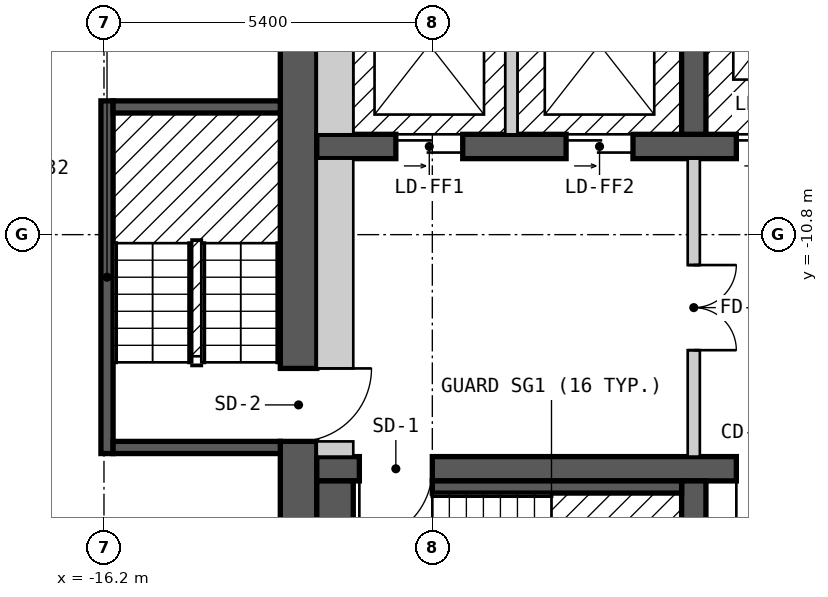
"""IFC4 building model, lengths in metres.
Left out: names, types, materials, properties, quantities, classifications, styles, units other than length and angle.
Written with IfcOpenShell. Run it as: python <this file> out.ifc"""

import sys

from ifc_helpers import new_model, si_unit, direction, frame, frame_2d, origin, origin_2d, place, context, subcontext, project, spatial, polyline, rectangle, outline, extrude, element, fill, save


model = new_model("IFC4")
c1 = context("Model", 3, precision=1e-05, world=origin(), true_north=direction((0.0, 1.0)))
c2 = subcontext(c1, "Body", "Model", "MODEL_VIEW")
j1 = project(units=[si_unit("LENGTHUNIT", "METRE"), si_unit("PLANEANGLEUNIT", "RADIAN")], contexts=[c1])
p1 = place(None, origin())
s1 = spatial("IfcSite", under=j1, at=p1, CompositionType="ELEMENT")
p2 = place(p1, origin())
s2 = spatial("IfcBuilding", under=s1, at=p2, CompositionType="ELEMENT")
p3 = place(p2, frame((0.0, 0.0, 196.2)))
s3 = spatial("IfcBuildingStorey", under=s2, at=p3, CompositionType="ELEMENT", Elevation=196.2)
p4 = place(p3, frame((-17.53, -15.736, 0.0), z_axis=(0.0, 0.0, 1.0), x_axis=(0.5, -0.866025403784, 0.0)))
e1 = element("IfcColumn", 1, at=p4, inside=s3, PredefinedType="COLUMN", context=c2, shape_type="SweptSolid", body=[
    extrude(rectangle(XDim=0.8, YDim=0.8, at=origin_2d()), origin(), (0.0, 0.0, 1.0), 3.0),
])
p5 = place(p3, frame((-13.0, -18.4, 0.0), z_axis=(0.0, 0.0, 1.0), x_axis=(0.0, 1.0, 0.0)))
e2 = element("IfcWall", 2, at=p5, inside=s3, PredefinedType="SHEAR", context=c2, shape_type="SweptSolid", body=[
    extrude(rectangle(XDim=12.8, YDim=0.6, at=frame_2d((6.4, 0.0))), origin(), (0.0, 0.0, 1.0), 2.6),
])
p6 = place(p5, frame((4.2, 0.0, 0.0)))
e3 = element("IfcOpeningElement", 3, at=p6, cuts=e2, PredefinedType="OPENING", context=c2, shape_type="SweptSolid", body=[
    extrude(rectangle(XDim=1.2, YDim=2.1, at=frame_2d((0.6, 1.05))), frame((0.0, 0.31, 0.0), z_axis=(0.0, -1.0, 0.0), x_axis=(1.0, 0.0, 0.0)), (0.0, 0.0, 1.0), 0.62),
])
p7 = place(p3, frame((-12.7, -14.65, 0.0), z_axis=(0.0, 0.0, 1.0), x_axis=(1.0, 0.0, 0.0)))
e4 = element("IfcWall", 4, at=p7, inside=s3, PredefinedType="SHEAR", context=c2, shape_type="SweptSolid", body=[
    extrude(rectangle(XDim=25.4, YDim=0.4, at=frame_2d((12.7, 0.0))), origin(), (0.0, 0.0, 1.0), 2.6),
])
p8 = place(p7, frame((1.9, 0.0, 0.0), z_axis=(0.0, 0.0, 1.0), x_axis=(-1.0, 0.0, 0.0)))
e5 = element("IfcOpeningElement", 5, at=p8, cuts=e4, PredefinedType="OPENING", context=c2, shape_type="SweptSolid", body=[
    extrude(rectangle(XDim=1.2, YDim=2.1, at=frame_2d((0.6, 1.05))), frame((0.0, 0.21, 0.0), z_axis=(0.0, -1.0, 0.0), x_axis=(1.0, 0.0, 0.0)), (0.0, 0.0, 1.0), 0.42),
])
p9 = place(p7, frame((24.75, 0.0, 0.0), z_axis=(0.0, 0.0, 1.0), x_axis=(-1.0, 0.0, 0.0)))
e6 = element("IfcOpeningElement", 6, at=p9, cuts=e4, PredefinedType="OPENING", context=c2, shape_type="SweptSolid", body=[
    extrude(rectangle(XDim=1.2, YDim=2.1, at=frame_2d((0.6, 1.05))), frame((0.0, 0.21, 0.0), z_axis=(0.0, -1.0, 0.0), x_axis=(1.0, 0.0, 0.0)), (0.0, 0.0, 1.0), 0.42),
])
p10 = place(p7, frame((7.8, 0.0, 0.0), z_axis=(0.0, 0.0, 1.0), x_axis=(-1.0, 0.0, 0.0)))
e7 = element("IfcOpeningElement", 7, at=p10, cuts=e4, PredefinedType="OPENING", context=c2, shape_type="SweptSolid", body=[
    extrude(rectangle(XDim=0.9, YDim=2.1, at=frame_2d((0.45, 1.05))), frame((0.0, 0.21, 0.0), z_axis=(0.0, -1.0, 0.0), x_axis=(1.0, 0.0, 0.0)), (0.0, 0.0, 1.0), 0.42),
])
p11 = place(p7, frame((9.85, 0.0, 0.0), z_axis=(0.0, 0.0, 1.0), x_axis=(-1.0, 0.0, 0.0)))
e8 = element("IfcOpeningElement", 8, at=p11, cuts=e4, PredefinedType="OPENING", context=c2, shape_type="SweptSolid", body=[
    extrude(rectangle(XDim=0.9, YDim=2.1, at=frame_2d((0.45, 1.05))), frame((0.0, 0.21, 0.0), z_axis=(0.0, -1.0, 0.0), x_axis=(1.0, 0.0, 0.0)), (0.0, 0.0, 1.0), 0.42),
])
p12 = place(p7, frame((12.15, 0.0, 0.0), z_axis=(0.0, 0.0, 1.0), x_axis=(-1.0, 0.0, 0.0)))
e9 = element("IfcOpeningElement", 9, at=p12, cuts=e4, PredefinedType="OPENING", context=c2, shape_type="SweptSolid", body=[
    extrude(rectangle(XDim=1.0, YDim=2.1, at=frame_2d((0.5, 1.05))), frame((0.0, 0.21, 0.0), z_axis=(0.0, -1.0, 0.0), x_axis=(1.0, 0.0, 0.0)), (0.0, 0.0, 1.0), 0.42),
])
p13 = place(p7, frame((14.35, 0.0, 0.0), z_axis=(0.0, 0.0, 1.0), x_axis=(-1.0, 0.0, 0.0)))
e10 = element("IfcOpeningElement", 10, at=p13, cuts=e4, PredefinedType="OPENING", context=c2, shape_type="SweptSolid", body=[
    extrude(rectangle(XDim=0.9, YDim=2.1, at=frame_2d((0.45, 1.05))), frame((0.0, 0.21, 0.0), z_axis=(0.0, -1.0, 0.0), x_axis=(1.0, 0.0, 0.0)), (0.0, 0.0, 1.0), 0.42),
])
p14 = place(p7, frame((16.35, 0.0, 0.0), z_axis=(0.0, 0.0, 1.0), x_axis=(-1.0, 0.0, 0.0)))
e11 = element("IfcOpeningElement", 11, at=p14, cuts=e4, PredefinedType="OPENING", context=c2, shape_type="SweptSolid", body=[
    extrude(rectangle(XDim=0.9, YDim=2.1, at=frame_2d((0.45, 1.05))), frame((0.0, 0.21, 0.0), z_axis=(0.0, -1.0, 0.0), x_axis=(1.0, 0.0, 0.0)), (0.0, 0.0, 1.0), 0.42),
])
p15 = place(p7, frame((18.5, 0.0, 0.0), z_axis=(0.0, 0.0, 1.0), x_axis=(-1.0, 0.0, 0.0)))
e12 = element("IfcOpeningElement", 12, at=p15, cuts=e4, PredefinedType="OPENING", context=c2, shape_type="SweptSolid", body=[
    extrude(rectangle(XDim=1.0, YDim=2.1, at=frame_2d((0.5, 1.05))), frame((0.0, 0.21, 0.0), z_axis=(0.0, -1.0, 0.0), x_axis=(1.0, 0.0, 0.0)), (0.0, 0.0, 1.0), 0.42),
])
p16 = place(p3, frame((-12.7, -9.35, 0.0), z_axis=(0.0, 0.0, 1.0), x_axis=(1.0, 0.0, 0.0)))
e13 = element("IfcWall", 13, at=p16, inside=s3, PredefinedType="SHEAR", context=c2, shape_type="SweptSolid", body=[
    extrude(rectangle(XDim=22.9, YDim=0.4, at=frame_2d((11.45, 0.0))), origin(), (0.0, 0.0, 1.0), 2.6),
])
p17 = place(p16, frame((1.3, 0.0, 0.0)))
e14 = element("IfcOpeningElement", 14, at=p17, cuts=e13, PredefinedType="OPENING", context=c2, shape_type="SweptSolid", body=[
    extrude(rectangle(XDim=1.1, YDim=2.1, at=frame_2d((0.55, 1.05))), frame((0.0, 0.21, 0.0), z_axis=(0.0, -1.0, 0.0), x_axis=(1.0, 0.0, 0.0)), (0.0, 0.0, 1.0), 0.42),
])
p18 = place(p16, frame((4.1, 0.0, 0.0)))
e15 = element("IfcOpeningElement", 15, at=p18, cuts=e13, PredefinedType="OPENING", context=c2, shape_type="SweptSolid", body=[
    extrude(rectangle(XDim=1.1, YDim=2.1, at=frame_2d((0.55, 1.05))), frame((0.0, 0.21, 0.0), z_axis=(0.0, -1.0, 0.0), x_axis=(1.0, 0.0, 0.0)), (0.0, 0.0, 1.0), 0.42),
])
p19 = place(p16, frame((6.9, 0.0, 0.0)))
e16 = element("IfcOpeningElement", 16, at=p19, cuts=e13, PredefinedType="OPENING", context=c2, shape_type="SweptSolid", body=[
    extrude(rectangle(XDim=1.1, YDim=2.1, at=frame_2d((0.55, 1.05))), frame((0.0, 0.21, 0.0), z_axis=(0.0, -1.0, 0.0), x_axis=(1.0, 0.0, 0.0)), (0.0, 0.0, 1.0), 0.42),
])
p20 = place(p16, frame((9.2, 0.0, 0.0)))
e17 = element("IfcOpeningElement", 17, at=p20, cuts=e13, PredefinedType="OPENING", context=c2, shape_type="SweptSolid", body=[
    extrude(rectangle(XDim=1.1, YDim=2.1, at=frame_2d((0.55, 1.05))), frame((0.0, 0.21, 0.0), z_axis=(0.0, -1.0, 0.0), x_axis=(1.0, 0.0, 0.0)), (0.0, 0.0, 1.0), 0.42),
])
p21 = place(p16, frame((11.5, 0.0, 0.0)))
e18 = element("IfcOpeningElement", 18, at=p21, cuts=e13, PredefinedType="OPENING", context=c2, shape_type="SweptSolid", body=[
    extrude(rectangle(XDim=1.1, YDim=2.1, at=frame_2d((0.55, 1.05))), frame((0.0, 0.21, 0.0), z_axis=(0.0, -1.0, 0.0), x_axis=(1.0, 0.0, 0.0)), (0.0, 0.0, 1.0), 0.42),
])
p22 = place(p16, frame((13.8, 0.0, 0.0)))
e19 = element("IfcOpeningElement", 19, at=p22, cuts=e13, PredefinedType="OPENING", context=c2, shape_type="SweptSolid", body=[
    extrude(rectangle(XDim=1.1, YDim=2.1, at=frame_2d((0.55, 1.05))), frame((0.0, 0.21, 0.0), z_axis=(0.0, -1.0, 0.0), x_axis=(1.0, 0.0, 0.0)), (0.0, 0.0, 1.0), 0.42),
])
p23 = place(p16, frame((16.1, 0.0, 0.0)))
e20 = element("IfcOpeningElement", 20, at=p23, cuts=e13, PredefinedType="OPENING", context=c2, shape_type="SweptSolid", body=[
    extrude(rectangle(XDim=1.1, YDim=2.1, at=frame_2d((0.55, 1.05))), frame((0.0, 0.21, 0.0), z_axis=(0.0, -1.0, 0.0), x_axis=(1.0, 0.0, 0.0)), (0.0, 0.0, 1.0), 0.42),
])
p24 = place(p16, frame((18.4, 0.0, 0.0)))
e21 = element("IfcOpeningElement", 21, at=p24, cuts=e13, PredefinedType="OPENING", context=c2, shape_type="SweptSolid", body=[
    extrude(rectangle(XDim=1.1, YDim=2.1, at=frame_2d((0.55, 1.05))), frame((0.0, 0.21, 0.0), z_axis=(0.0, -1.0, 0.0), x_axis=(1.0, 0.0, 0.0)), (0.0, 0.0, 1.0), 0.42),
])
p25 = place(p16, frame((20.8, 0.0, 0.0)))
e22 = element("IfcOpeningElement", 22, at=p25, cuts=e13, PredefinedType="OPENING", context=c2, shape_type="SweptSolid", body=[
    extrude(rectangle(XDim=1.1, YDim=2.1, at=frame_2d((0.55, 1.05))), frame((0.0, 0.21, 0.0), z_axis=(0.0, -1.0, 0.0), x_axis=(1.0, 0.0, 0.0)), (0.0, 0.0, 1.0), 0.42),
])
for number, where, z_axis, x_axis in (
    (23, (-6.5, -18.4, 0.0), (0.0, 0.0, 1.0), (0.0, 1.0, 0.0)),
    (24, (-6.5, -9.15, 0.0), (0.0, 0.0, 1.0), (0.0, 1.0, 0.0)),
):
    element("IfcWall", number, at=place(p3, frame(where, z_axis=z_axis, x_axis=x_axis)), inside=s3, PredefinedType="SHEAR", context=c2, shape_type="SweptSolid", body=[
        extrude(rectangle(XDim=3.55, YDim=0.4, at=frame_2d((1.775, 0.0))), origin(), (0.0, 0.0, 1.0), 2.6),
    ])
p26 = place(p3, frame((-26.024, -3.025, 0.0), z_axis=(0.0, 0.0, 1.0), x_axis=(0.500018670445, -0.86601462413, 0.0)))
e25 = element("IfcWall", 25, at=p26, inside=s3, PredefinedType="SOLIDWALL", context=c2, shape_type="SweptSolid", body=[
    extrude(outline(polyline([(0.0, -0.15), (20.785, -0.15), (20.705, 0.15), (0.08, 0.15), (0.0, -0.15)])), origin(), (0.0, 0.0, 1.0), 2.6),
])
p27 = place(p26, frame((1.13, 0.0, 0.15)))
e26 = element("IfcOpeningElement", 26, at=p27, cuts=e25, PredefinedType="OPENING", context=c2, shape_type="SweptSolid", body=[
    extrude(rectangle(XDim=1.5, YDim=2.1, at=frame_2d((0.75, 1.05))), frame((0.0, 0.16, 0.0), z_axis=(0.0, -1.0, 0.0), x_axis=(1.0, 0.0, 0.0)), (0.0, 0.0, 1.0), 0.32),
])
p28 = place(p26, frame((3.562, 0.0, 0.15)))
e27 = element("IfcOpeningElement", 27, at=p28, cuts=e25, PredefinedType="OPENING", context=c2, shape_type="SweptSolid", body=[
    extrude(rectangle(XDim=1.5, YDim=2.1, at=frame_2d((0.75, 1.05))), frame((0.0, 0.16, 0.0), z_axis=(0.0, -1.0, 0.0), x_axis=(1.0, 0.0, 0.0)), (0.0, 0.0, 1.0), 0.32),
])
p29 = place(p26, frame((5.994, 0.0, 0.15)))
e28 = element("IfcOpeningElement", 28, at=p29, cuts=e25, PredefinedType="OPENING", context=c2, shape_type="SweptSolid", body=[
    extrude(rectangle(XDim=1.5, YDim=2.1, at=frame_2d((0.75, 1.05))), frame((0.0, 0.16, 0.0), z_axis=(0.0, -1.0, 0.0), x_axis=(1.0, 0.0, 0.0)), (0.0, 0.0, 1.0), 0.32),
])
p30 = place(p26, frame((8.425, 0.0, 0.15)))
e29 = element("IfcOpeningElement", 29, at=p30, cuts=e25, PredefinedType="OPENING", context=c2, shape_type="SweptSolid", body=[
    extrude(rectangle(XDim=1.5, YDim=2.1, at=frame_2d((0.75, 1.05))), frame((0.0, 0.16, 0.0), z_axis=(0.0, -1.0, 0.0), x_axis=(1.0, 0.0, 0.0)), (0.0, 0.0, 1.0), 0.32),
])
p31 = place(p26, frame((10.857, 0.0, 0.15)))
e30 = element("IfcOpeningElement", 30, at=p31, cuts=e25, PredefinedType="OPENING", context=c2, shape_type="SweptSolid", body=[
    extrude(rectangle(XDim=1.5, YDim=2.1, at=frame_2d((0.75, 1.05))), frame((0.0, 0.16, 0.0), z_axis=(0.0, -1.0, 0.0), x_axis=(1.0, 0.0, 0.0)), (0.0, 0.0, 1.0), 0.32),
])
p32 = place(p26, frame((13.289, 0.0, 0.15)))
e31 = element("IfcOpeningElement", 31, at=p32, cuts=e25, PredefinedType="OPENING", context=c2, shape_type="SweptSolid", body=[
    extrude(rectangle(XDim=1.5, YDim=2.1, at=frame_2d((0.75, 1.05))), frame((0.0, 0.16, 0.0), z_axis=(0.0, -1.0, 0.0), x_axis=(1.0, 0.0, 0.0)), (0.0, 0.0, 1.0), 0.32),
])
p33 = place(p26, frame((15.722, 0.0, 0.15)))
e32 = element("IfcOpeningElement", 32, at=p33, cuts=e25, PredefinedType="OPENING", context=c2, shape_type="SweptSolid", body=[
    extrude(rectangle(XDim=1.5, YDim=2.1, at=frame_2d((0.75, 1.05))), frame((0.0, 0.16, 0.0), z_axis=(0.0, -1.0, 0.0), x_axis=(1.0, 0.0, 0.0)), (0.0, 0.0, 1.0), 0.32),
])
p34 = place(p26, frame((18.154, 0.0, 0.15)))
e33 = element("IfcOpeningElement", 33, at=p34, cuts=e25, PredefinedType="OPENING", context=c2, shape_type="SweptSolid", body=[
    extrude(rectangle(XDim=1.5, YDim=2.1, at=frame_2d((0.75, 1.05))), frame((0.0, 0.16, 0.0), z_axis=(0.0, -1.0, 0.0), x_axis=(1.0, 0.0, 0.0)), (0.0, 0.0, 1.0), 0.32),
])
p35 = place(p3, frame((-23.13, -7.737, 0.0), z_axis=(0.0, 0.0, 1.0), x_axis=(0.866033148899, 0.499986584829, 0.0)))
e34 = element("IfcWall", 34, at=p35, inside=s3, PredefinedType="PARTITIONING", context=c2, shape_type="SweptSolid", body=[
    extrude(rectangle(XDim=8.695, YDim=0.2, at=frame_2d((4.347, 0.0))), origin(), (0.0, 0.0, 1.0), 2.6),
])
p36 = place(p3, frame((-16.15, -14.4, 0.0), z_axis=(0.0, 0.0, 1.0), x_axis=(0.0, 1.0, 0.0)))
e35 = element("IfcWall", 35, at=p36, inside=s3, PredefinedType="SOLIDWALL", context=c2, shape_type="SweptSolid", body=[
    extrude(rectangle(XDim=5.8, YDim=0.2, at=frame_2d((2.9, 0.0))), origin(), (0.0, 0.0, 1.0), 2.6),
])
for number, where, z_axis, x_axis in (
    (36, (-16.05, -14.3, 0.0), (0.0, 0.0, 1.0), (1.0, 0.0, 0.0)),
    (37, (-16.05, -8.7, 0.0), (0.0, 0.0, 1.0), (1.0, 0.0, 0.0)),
):
    element("IfcWall", number, at=place(p3, frame(where, z_axis=z_axis, x_axis=x_axis)), inside=s3, PredefinedType="SOLIDWALL", context=c2, shape_type="SweptSolid", body=[
        extrude(rectangle(XDim=2.75, YDim=0.2, at=frame_2d((1.375, 0.0))), origin(), (0.0, 0.0, 1.0), 2.6),
    ])
p37 = place(p3, frame((-12.4, -18.4, 0.0), z_axis=(0.0, 0.0, 1.0), x_axis=(0.0, 1.0, 0.0)))
e38 = element("IfcWall", 38, at=p37, inside=s3, PredefinedType="SOLIDWALL", context=c2, shape_type="SweptSolid", body=[
    extrude(rectangle(XDim=3.55, YDim=0.6, at=frame_2d((1.775, 0.0))), origin(), (0.0, 0.0, 1.0), 2.6),
])
p38 = place(p3, frame((-12.7, -14.325, 0.0), z_axis=(0.0, 0.0, 1.0), x_axis=(1.0, 0.0, 0.0)))
e39 = element("IfcWall", 39, at=p38, inside=s3, PredefinedType="PARTITIONING", context=c2, shape_type="SweptSolid", body=[
    extrude(rectangle(XDim=0.6, YDim=0.25, at=frame_2d((0.3, 0.0))), origin(), (0.0, 0.0, 1.0), 2.6),
])
p39 = place(p3, frame((-12.4, -13.0, 0.0), z_axis=(0.0, 0.0, 1.0), x_axis=(0.0, 1.0, 0.0)))
e40 = element("IfcWall", 40, at=p39, inside=s3, PredefinedType="PARTITIONING", context=c2, shape_type="SweptSolid", body=[
    extrude(rectangle(XDim=3.45, YDim=0.6, at=frame_2d((1.725, 0.0))), origin(), (0.0, 0.0, 1.0), 2.6),
])
p40 = place(p3, frame((-12.4, -9.15, 0.0), z_axis=(0.0, 0.0, 1.0), x_axis=(0.0, 1.0, 0.0)))
e41 = element("IfcWall", 41, at=p40, inside=s3, PredefinedType="SOLIDWALL", context=c2, shape_type="SweptSolid", body=[
    extrude(rectangle(XDim=3.55, YDim=0.6, at=frame_2d((1.775, 0.0))), origin(), (0.0, 0.0, 1.0), 2.6),
])
p41 = place(p3, frame((-10.8, -14.95, 0.0), z_axis=(0.0, 0.0, 1.0), x_axis=(1.0, 0.0, 0.0)))
e42 = element("IfcWall", 42, at=p41, inside=s3, PredefinedType="SOLIDWALL", context=c2, shape_type="SweptSolid", body=[
    extrude(rectangle(XDim=4.1, YDim=0.2, at=frame_2d((2.05, 0.0))), origin(), (0.0, 0.0, 1.0), 2.6),
])
p42 = place(p3, frame((-9.5, -9.15, 0.0), z_axis=(0.0, 0.0, 1.0), x_axis=(0.0, 1.0, 0.0)))
e43 = element("IfcWall", 43, at=p42, inside=s3, PredefinedType="SOLIDWALL", context=c2, shape_type="SweptSolid", body=[
    extrude(rectangle(XDim=2.95, YDim=0.2, at=frame_2d((1.475, 0.0))), origin(), (0.0, 0.0, 1.0), 2.6),
])
p43 = place(p3, frame((-6.5, -14.45, 0.0), z_axis=(0.0, 0.0, 1.0), x_axis=(0.0, 1.0, 0.0)))
e44 = element("IfcWall", 44, at=p43, inside=s3, PredefinedType="PARTITIONING", context=c2, shape_type="SweptSolid", body=[
    extrude(rectangle(XDim=4.9, YDim=0.2, at=frame_2d((2.45, 0.0))), origin(), (0.0, 0.0, 1.0), 2.6),
])
p44 = place(p43, frame((3.15, 0.0, 0.0), z_axis=(0.0, 0.0, 1.0), x_axis=(-1.0, 0.0, 0.0)))
e45 = element("IfcOpeningElement", 45, at=p44, cuts=e44, PredefinedType="OPENING", context=c2, shape_type="SweptSolid", body=[
    extrude(rectangle(XDim=1.4, YDim=2.1, at=frame_2d((0.7, 1.05))), frame((0.0, 0.11, 0.0), z_axis=(0.0, -1.0, 0.0), x_axis=(1.0, 0.0, 0.0)), (0.0, 0.0, 1.0), 0.22),
])
p45 = place(p17, origin())
e46 = element("IfcDoor", 46, at=p45, inside=s3, OperationType="DOUBLE_DOOR_SLIDING", PredefinedType="DOOR", context=c2, shape_type="SweptSolid", body=[
    extrude(rectangle(XDim=1.1, YDim=2.1, at=frame_2d((0.55, 1.05))), frame((0.0, 0.025, 0.0), z_axis=(0.0, -1.0, 0.0), x_axis=(1.0, 0.0, 0.0)), (0.0, 0.0, 1.0), 0.05),
])
fill(e14, e46)
p46 = place(p18, origin())
e47 = element("IfcDoor", 47, at=p46, inside=s3, OperationType="DOUBLE_DOOR_SLIDING", PredefinedType="DOOR", context=c2, shape_type="SweptSolid", body=[
    extrude(rectangle(XDim=1.1, YDim=2.1, at=frame_2d((0.55, 1.05))), frame((0.0, 0.025, 0.0), z_axis=(0.0, -1.0, 0.0), x_axis=(1.0, 0.0, 0.0)), (0.0, 0.0, 1.0), 0.05),
])
fill(e15, e47)
p47 = place(p19, origin())
e48 = element("IfcDoor", 48, at=p47, inside=s3, OperationType="DOUBLE_DOOR_SLIDING", PredefinedType="DOOR", context=c2, shape_type="SweptSolid", body=[
    extrude(rectangle(XDim=1.1, YDim=2.1, at=frame_2d((0.55, 1.05))), frame((0.0, 0.025, 0.0), z_axis=(0.0, -1.0, 0.0), x_axis=(1.0, 0.0, 0.0)), (0.0, 0.0, 1.0), 0.05),
])
fill(e16, e48)
p48 = place(p8, origin())
e49 = element("IfcDoor", 49, at=p48, inside=s3, OperationType="SINGLE_SWING_RIGHT", PredefinedType="DOOR", context=c2, shape_type="SweptSolid", body=[
    extrude(rectangle(XDim=1.2, YDim=2.1, at=frame_2d((0.6, 1.05))), frame((0.0, 0.025, 0.0), z_axis=(0.0, -1.0, 0.0), x_axis=(1.0, 0.0, 0.0)), (0.0, 0.0, 1.0), 0.05),
])
fill(e5, e49)
p49 = place(p6, origin())
e50 = element("IfcDoor", 50, at=p49, inside=s3, OperationType="SINGLE_SWING_RIGHT", PredefinedType="DOOR", context=c2, shape_type="SweptSolid", body=[
    extrude(rectangle(XDim=1.2, YDim=2.1, at=frame_2d((0.6, 1.05))), frame((0.0, 0.025, 0.0), z_axis=(0.0, -1.0, 0.0), x_axis=(1.0, 0.0, 0.0)), (0.0, 0.0, 1.0), 0.05),
])
fill(e3, e50)
p50 = place(p44, origin())
e51 = element("IfcDoor", 51, at=p50, inside=s3, OperationType="DOUBLE_DOOR_SINGLE_SWING", PredefinedType="DOOR", context=c2, shape_type="SweptSolid", body=[
    extrude(rectangle(XDim=1.4, YDim=2.1, at=frame_2d((0.7, 1.05))), frame((0.0, 0.025, 0.0), z_axis=(0.0, -1.0, 0.0), x_axis=(1.0, 0.0, 0.0)), (0.0, 0.0, 1.0), 0.05),
])
fill(e45, e51)
p51 = place(p10, origin())
e52 = element("IfcDoor", 52, at=p51, inside=s3, OperationType="SINGLE_SWING_RIGHT", PredefinedType="DOOR", context=c2, shape_type="SweptSolid", body=[
    extrude(rectangle(XDim=0.9, YDim=2.1, at=frame_2d((0.45, 1.05))), frame((0.0, 0.025, 0.0), z_axis=(0.0, -1.0, 0.0), x_axis=(1.0, 0.0, 0.0)), (0.0, 0.0, 1.0), 0.05),
])
fill(e7, e52)
save(model, sys.argv[1])
